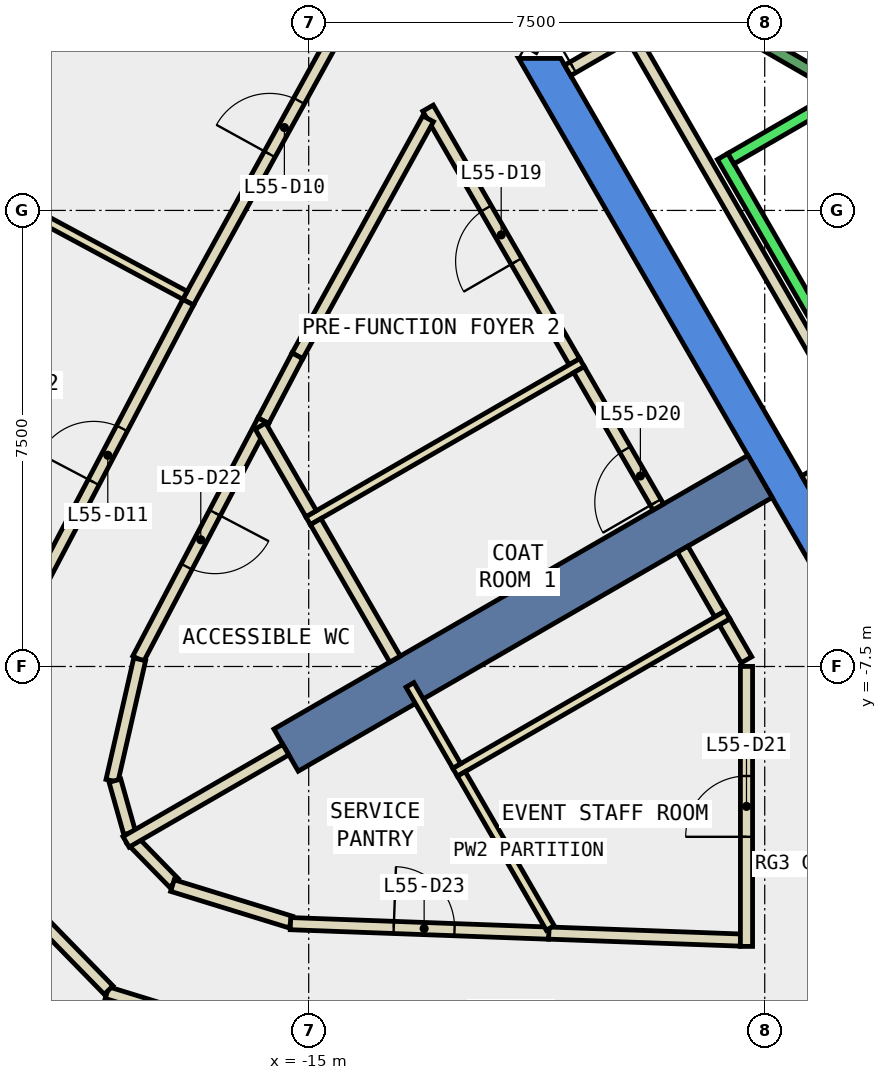
"""IFC4 building model, lengths in metres.
Left out: names, types, materials, properties, quantities, classifications, styles, units other than length and angle.
Written with IfcOpenShell. Run it as: python <this file> out.ifc"""

import sys

from ifc_helpers import new_model, si_unit, direction, frame, frame_2d, origin, place, context, subcontext, project, spatial, polyline, rectangle, outline, extrude, element, fill, save


model = new_model("IFC4")
c1 = context("Model", 3, precision=1e-05, world=origin(), true_north=direction((0.0, 1.0)))
c2 = subcontext(c1, "Body", "Model", "MODEL_VIEW")
j1 = project(units=[si_unit("LENGTHUNIT", "METRE"), si_unit("PLANEANGLEUNIT", "RADIAN")], contexts=[c1])
p1 = place(None, origin())
s1 = spatial("IfcSite", under=j1, at=p1, CompositionType="ELEMENT")
p2 = place(p1, origin())
s2 = spatial("IfcBuilding", under=s1, at=p2, CompositionType="ELEMENT")
p3 = place(p2, frame((0.0, 0.0, 245.0)))
s3 = spatial("IfcBuildingStorey", under=s2, at=p3, CompositionType="ELEMENT", Elevation=245.0)
p4 = place(p3, frame((0.0, 0.0, -0.34)))
e1 = element("IfcWall", 1, at=p4, inside=s3, PredefinedType="SHEAR", context=c2, shape_type="SweptSolid", body=[
    extrude(outline(polyline([(-11.547, 2.5), (-5.774, -7.5), (-5.427, -6.9), (-10.854, 2.5), (-11.547, 2.5)])), origin(), (0.0, 0.0, 1.0), 3.6),
])
p5 = place(p3, frame((-7.578, -4.375, -0.34), z_axis=(0.0, 0.0, 1.0), x_axis=(-0.866024315419, -0.5000018851, 0.0)))
e2 = element("IfcWall", 2, at=p5, inside=s3, PredefinedType="SHEAR", context=c2, shape_type="SweptSolid", body=[
    extrude(rectangle(XDim=9.0, YDim=0.8, at=frame_2d((4.5, 0.0))), origin(), (0.0, 0.0, 1.0), 3.6),
])
p6 = place(p3, frame((-18.805, 6.475, 0.0), z_axis=(0.0, 0.0, 1.0), x_axis=(-0.482734585173, -0.875766704253, 0.0)))
e3 = element("IfcWall", 3, at=p6, inside=s3, PredefinedType="STANDARD", context=c2, shape_type="SweptSolid", body=[
    extrude(rectangle(XDim=5.593, YDim=0.3, at=frame_2d((2.796, 0.0))), origin(), (0.0, 0.0, 1.0), 3.26),
])
p7 = place(p6, frame((0.698, 0.0, 0.9)))
e4 = element("IfcOpeningElement", 4, at=p7, cuts=e3, PredefinedType="OPENING", context=c2, shape_type="SweptSolid", body=[
    extrude(rectangle(XDim=1.4, YDim=2.0, at=frame_2d((0.7, 1.0))), frame((0.0, 0.16, 0.0), z_axis=(0.0, -1.0, 0.0), x_axis=(1.0, 0.0, 0.0)), (0.0, 0.0, 1.0), 0.32),
])
p8 = place(p6, frame((3.495, 0.0, 0.9)))
e5 = element("IfcOpeningElement", 5, at=p8, cuts=e3, PredefinedType="OPENING", context=c2, shape_type="SweptSolid", body=[
    extrude(rectangle(XDim=1.4, YDim=2.0, at=frame_2d((0.7, 1.0))), frame((0.0, 0.16, 0.0), z_axis=(0.0, -1.0, 0.0), x_axis=(1.0, 0.0, 0.0)), (0.0, 0.0, 1.0), 0.32),
])
p9 = place(p3, frame((-10.63, -2.488, 0.0), z_axis=(0.0, 0.0, 1.0), x_axis=(-0.500108649621, 0.865962665808, 0.0)))
e6 = element("IfcWall", 6, at=p9, inside=s3, PredefinedType="PARTITIONING", context=c2, shape_type="SweptSolid", body=[
    extrude(rectangle(XDim=4.815, YDim=0.2, at=frame_2d((2.408, 0.0))), origin(), (0.0, 0.0, 1.0), 3.26),
])
p10 = place(p9, frame((1.908, 0.0, 0.0)))
e7 = element("IfcOpeningElement", 7, at=p10, cuts=e6, PredefinedType="OPENING", context=c2, shape_type="SweptSolid", body=[
    extrude(rectangle(XDim=1.0, YDim=2.1, at=frame_2d((0.5, 1.05))), frame((0.0, 0.11, 0.0), z_axis=(0.0, -1.0, 0.0), x_axis=(1.0, 0.0, 0.0)), (0.0, 0.0, 1.0), 0.22),
])
p11 = place(p3, frame((-13.036, 1.508, 0.0), z_axis=(0.0, 0.0, 1.0), x_axis=(-0.482884552822, -0.87568402329, 0.0)))
e8 = element("IfcWall", 8, at=p11, inside=s3, PredefinedType="PARTITIONING", context=c2, shape_type="SweptSolid", body=[
    extrude(rectangle(XDim=4.453, YDim=0.2, at=frame_2d((2.226, 0.0))), origin(), (0.0, 0.0, 1.0), 3.26),
])
p12 = place(p3, frame((-15.186, -2.391, 0.0), z_axis=(0.0, 0.0, 1.0), x_axis=(-0.464794189951, -0.885418748948, 0.0)))
e9 = element("IfcWall", 9, at=p12, inside=s3, PredefinedType="PARTITIONING", context=c2, shape_type="SweptSolid", body=[
    extrude(rectangle(XDim=1.205, YDim=0.2, at=frame_2d((0.603, 0.0))), origin(), (0.0, 0.0, 1.0), 3.26),
])
p13 = place(p3, frame((-8.235, -6.636, 0.0), z_axis=(0.0, 0.0, 1.0), x_axis=(-0.500089055364, 0.86597398154, 0.0)))
e10 = element("IfcWall", 10, at=p13, inside=s3, PredefinedType="PARTITIONING", context=c2, shape_type="SweptSolid", body=[
    extrude(rectangle(XDim=1.23, YDim=0.2, at=frame_2d((0.615, 0.0))), origin(), (0.0, 0.0, 1.0), 3.26),
])
p14 = place(p3, frame((-7.8, -7.39, 0.0), z_axis=(0.0, 0.0, 1.0), x_axis=(-0.499712670472, 0.866191230024, 0.0)))
e11 = element("IfcWall", 11, at=p14, inside=s3, PredefinedType="PARTITIONING", context=c2, shape_type="SweptSolid", body=[
    extrude(rectangle(XDim=0.72, YDim=0.2, at=frame_2d((0.36, 0.0))), origin(), (0.0, 0.0, 1.0), 3.26),
])
p15 = place(p3, frame((-11.052, -11.884, 0.0), z_axis=(0.0, 0.0, 1.0), x_axis=(0.999335249241, -0.036456270033, 0.0)))
e12 = element("IfcWall", 12, at=p15, inside=s3, PredefinedType="PARTITIONING", context=c2, shape_type="SweptSolid", body=[
    extrude(rectangle(XDim=3.154, YDim=0.2, at=frame_2d((1.577, 0.0))), origin(), (0.0, 0.0, 1.0), 3.26),
])
p16 = place(p3, frame((-15.746, -3.458, 0.0), z_axis=(0.0, 0.0, 1.0), x_axis=(-0.465179971699, -0.885216128372, 0.0)))
e13 = element("IfcWall", 13, at=p16, inside=s3, PredefinedType="PARTITIONING", context=c2, shape_type="SweptSolid", body=[
    extrude(rectangle(XDim=4.424, YDim=0.2, at=frame_2d((2.212, 0.0))), origin(), (0.0, 0.0, 1.0), 3.26),
])
p17 = place(p16, frame((1.712, 0.0, 0.0)))
e14 = element("IfcOpeningElement", 14, at=p17, cuts=e13, PredefinedType="OPENING", context=c2, shape_type="SweptSolid", body=[
    extrude(rectangle(XDim=1.0, YDim=2.1, at=frame_2d((0.5, 1.05))), frame((0.0, 0.11, 0.0), z_axis=(0.0, -1.0, 0.0), x_axis=(1.0, 0.0, 0.0)), (0.0, 0.0, 1.0), 0.22),
])
p18 = place(p3, frame((-17.78, -7.383, 0.0), z_axis=(0.0, 0.0, 1.0), x_axis=(-0.222760041204, -0.974873306662, 0.0)))
e15 = element("IfcWall", 15, at=p18, inside=s3, PredefinedType="PARTITIONING", context=c2, shape_type="SweptSolid", body=[
    extrude(rectangle(XDim=2.047, YDim=0.2, at=frame_2d((1.024, 0.0))), origin(), (0.0, 0.0, 1.0), 3.26),
])
p19 = place(p3, frame((-18.187, -9.378, 0.0), z_axis=(0.0, 0.0, 1.0), x_axis=(0.270785141481, -0.962639811743, 0.0)))
e16 = element("IfcWall", 16, at=p19, inside=s3, PredefinedType="PARTITIONING", context=c2, shape_type="SweptSolid", body=[
    extrude(rectangle(XDim=0.894, YDim=0.2, at=frame_2d((0.447, 0.0))), origin(), (0.0, 0.0, 1.0), 3.26),
])
p20 = place(p3, frame((-17.915, -10.344, 0.0), z_axis=(0.0, 0.0, 1.0), x_axis=(0.698527813511, -0.715582904877, 0.0)))
e17 = element("IfcWall", 17, at=p20, inside=s3, PredefinedType="PARTITIONING", context=c2, shape_type="SweptSolid", body=[
    extrude(rectangle(XDim=1.002, YDim=0.2, at=frame_2d((0.501, 0.0))), origin(), (0.0, 0.0, 1.0), 3.26),
])
p21 = place(p3, frame((-17.241, -11.103, 0.0), z_axis=(0.0, 0.0, 1.0), x_axis=(0.95563113363, -0.294566013716, 0.0)))
e18 = element("IfcWall", 18, at=p21, inside=s3, PredefinedType="PARTITIONING", context=c2, shape_type="SweptSolid", body=[
    extrude(rectangle(XDim=2.036, YDim=0.2, at=frame_2d((1.018, 0.0))), origin(), (0.0, 0.0, 1.0), 3.26),
])
p22 = place(p3, frame((-15.3, -11.729, 0.0), z_axis=(0.0, 0.0, 1.0), x_axis=(0.999326350165, -0.036699398722, 0.0)))
e19 = element("IfcWall", 19, at=p22, inside=s3, PredefinedType="PARTITIONING", context=c2, shape_type="SweptSolid", body=[
    extrude(rectangle(XDim=4.251, YDim=0.2, at=frame_2d((2.125, 0.0))), origin(), (0.0, 0.0, 1.0), 3.26),
])
p23 = place(p22, frame((1.7, 0.0, 0.0)))
e20 = element("IfcOpeningElement", 20, at=p23, cuts=e19, PredefinedType="OPENING", context=c2, shape_type="SweptSolid", body=[
    extrude(rectangle(XDim=1.0, YDim=2.1, at=frame_2d((0.5, 1.05))), frame((0.0, 0.11, 0.0), z_axis=(0.0, -1.0, 0.0), x_axis=(1.0, 0.0, 0.0)), (0.0, 0.0, 1.0), 0.22),
])
p24 = place(p3, frame((-16.983, -1.509, 0.0), z_axis=(0.0, 0.0, 1.0), x_axis=(0.482785999899, 0.875738361785, 0.0)))
e21 = element("IfcWall", 21, at=p24, inside=s3, PredefinedType="PARTITIONING", context=c2, shape_type="SweptSolid", body=[
    extrude(rectangle(XDim=6.558, YDim=0.2, at=frame_2d((3.279, 0.0))), origin(), (0.0, 0.0, 1.0), 3.26),
])
p25 = place(p24, frame((2.779, 0.0, 0.0)))
e22 = element("IfcOpeningElement", 22, at=p25, cuts=e21, PredefinedType="OPENING", context=c2, shape_type="SweptSolid", body=[
    extrude(rectangle(XDim=1.0, YDim=2.1, at=frame_2d((0.5, 1.05))), frame((0.0, 0.11, 0.0), z_axis=(0.0, -1.0, 0.0), x_axis=(1.0, 0.0, 0.0)), (0.0, 0.0, 1.0), 0.22),
])
p26 = place(p3, frame((-19.696, -6.675, 0.0), z_axis=(0.0, 0.0, 1.0), x_axis=(0.465165163774, 0.88522390976, 0.0)))
e23 = element("IfcWall", 23, at=p26, inside=s3, PredefinedType="PARTITIONING", context=c2, shape_type="SweptSolid", body=[
    extrude(rectangle(XDim=5.835, YDim=0.2, at=frame_2d((2.917, 0.0))), origin(), (0.0, 0.0, 1.0), 3.26),
])
p27 = place(p26, frame((2.492, 0.0, 0.0)))
e24 = element("IfcOpeningElement", 24, at=p27, cuts=e23, PredefinedType="OPENING", context=c2, shape_type="SweptSolid", body=[
    extrude(rectangle(XDim=1.0, YDim=2.1, at=frame_2d((0.5, 1.05))), frame((0.0, 0.11, 0.0), z_axis=(0.0, -1.0, 0.0), x_axis=(1.0, 0.0, 0.0)), (0.0, 0.0, 1.0), 0.22),
])
p28 = place(p3, frame((-15.632, -13.692, 0.0), z_axis=(0.0, 0.0, 1.0), x_axis=(-0.955600342663, 0.294665887239, 0.0)))
e25 = element("IfcWall", 25, at=p28, inside=s3, PredefinedType="PARTITIONING", context=c2, shape_type="SweptSolid", body=[
    extrude(rectangle(XDim=2.81, YDim=0.2, at=frame_2d((1.405, 0.0))), origin(), (0.0, 0.0, 1.0), 3.26),
])
p29 = place(p3, frame((-18.291, -12.822, 0.0), z_axis=(0.0, 0.0, 1.0), x_axis=(-0.698477855606, 0.715631668687, 0.0)))
e26 = element("IfcWall", 26, at=p29, inside=s3, PredefinedType="PARTITIONING", context=c2, shape_type="SweptSolid", body=[
    extrude(rectangle(XDim=1.921, YDim=0.2, at=frame_2d((0.961, 0.0))), origin(), (0.0, 0.0, 1.0), 3.26),
])
p30 = place(p3, frame((-5.888, -3.902, 0.0), z_axis=(0.0, 0.0, 1.0), x_axis=(-0.86621513555, -0.499671230855, 0.0)))
e27 = element("IfcWall", 27, at=p30, inside=s3, PredefinedType="PARTITIONING", context=c2, shape_type="SweptSolid", body=[
    extrude(rectangle(XDim=1.1, YDim=0.2, at=frame_2d((0.55, 0.0))), origin(), (0.0, 0.0, 1.0), 3.26),
])
p31 = place(p3, frame((-10.741, 2.303, 0.0), z_axis=(0.0, 0.0, 1.0), x_axis=(0.866063652425, 0.499933745558, 0.0)))
e28 = element("IfcWall", 28, at=p31, inside=s3, PredefinedType="PARTITIONING", context=c2, shape_type="SweptSolid", body=[
    extrude(rectangle(XDim=1.1, YDim=0.2, at=frame_2d((0.55, 0.0))), origin(), (0.0, 0.0, 1.0), 3.26),
])
p32 = place(p31, frame((0.1, 0.0, 0.0)))
e29 = element("IfcOpeningElement", 29, at=p32, cuts=e28, PredefinedType="OPENING", context=c2, shape_type="SweptSolid", body=[
    extrude(rectangle(XDim=0.9, YDim=2.1, at=frame_2d((0.45, 1.05))), frame((0.0, 0.11, 0.0), z_axis=(0.0, -1.0, 0.0), x_axis=(1.0, 0.0, 0.0)), (0.0, 0.0, 1.0), 0.22),
])
p33 = place(p3, frame((-9.751, 2.99, 0.0), z_axis=(0.0, 0.0, 1.0), x_axis=(0.500012163284, -0.866018381195, 0.0)))
e30 = element("IfcWall", 30, at=p33, inside=s3, PredefinedType="PARTITIONING", context=c2, shape_type="SweptSolid", body=[
    extrude(rectangle(XDim=8.0, YDim=0.2, at=frame_2d((4.0, 0.0))), origin(), (0.0, 0.0, 1.0), 3.26),
])
p34 = place(p3, frame((-7.8, -12.103, 0.0), z_axis=(0.0, 0.0, 1.0), x_axis=(0.0, 1.0, 0.0)))
e31 = element("IfcWall", 31, at=p34, inside=s3, PredefinedType="PARTITIONING", context=c2, shape_type="SweptSolid", body=[
    extrude(rectangle(XDim=4.604, YDim=0.2, at=frame_2d((2.302, 0.0))), origin(), (0.0, 0.0, 1.0), 3.26),
])
p35 = place(p34, frame((1.802, 0.0, 0.0)))
e32 = element("IfcOpeningElement", 32, at=p35, cuts=e31, PredefinedType="OPENING", context=c2, shape_type="SweptSolid", body=[
    extrude(rectangle(XDim=1.0, YDim=2.1, at=frame_2d((0.5, 1.05))), frame((0.0, 0.11, 0.0), z_axis=(0.0, -1.0, 0.0), x_axis=(1.0, 0.0, 0.0)), (0.0, 0.0, 1.0), 0.22),
])
p36 = place(p3, frame((-10.506, -2.503, 0.0), z_axis=(0.0, 0.0, 1.0), x_axis=(-0.866044872465, -0.49996627774, 0.0)))
e33 = element("IfcWall", 33, at=p36, inside=s3, PredefinedType="PARTITIONING", context=c2, shape_type="SweptSolid", body=[
    extrude(rectangle(XDim=5.2, YDim=0.15, at=frame_2d((2.6, 0.0))), origin(), (0.0, 0.0, 1.0), 3.26),
])
p37 = place(p3, frame((-14.96, -4.988, 0.0), z_axis=(0.0, 0.0, 1.0), x_axis=(-0.500175017317, 0.865924333907, 0.0)))
e34 = element("IfcWall", 34, at=p37, inside=s3, PredefinedType="PARTITIONING", context=c2, shape_type="SweptSolid", body=[
    extrude(rectangle(XDim=1.666, YDim=0.2, at=frame_2d((0.833, 0.0))), origin(), (0.0, 0.0, 1.0), 3.26),
])
p38 = place(p3, frame((-8.111, -6.651, 0.0), z_axis=(0.0, 0.0, 1.0), x_axis=(-0.865984471925, -0.50007088936, 0.0)))
e35 = element("IfcWall", 35, at=p38, inside=s3, PredefinedType="PARTITIONING", context=c2, shape_type="SweptSolid", body=[
    extrude(rectangle(XDim=5.176, YDim=0.15, at=frame_2d((2.588, 0.0))), origin(), (0.0, 0.0, 1.0), 3.26),
])
p39 = place(p3, frame((-13.58, -7.379, 0.0), z_axis=(0.0, 0.0, 1.0), x_axis=(-0.499870876044, 0.866099940701, 0.0)))
e36 = element("IfcWall", 36, at=p39, inside=s3, PredefinedType="PARTITIONING", context=c2, shape_type="SweptSolid", body=[
    extrude(rectangle(XDim=2.611, YDim=0.2, at=frame_2d((1.305, 0.0))), origin(), (0.0, 0.0, 1.0), 3.26),
])
p40 = place(p3, frame((-12.565, -9.136, 0.0), z_axis=(0.0, 0.0, 1.0), x_axis=(-0.500198329269, 0.865910868044, 0.0)))
e37 = element("IfcWall", 37, at=p40, inside=s3, PredefinedType="PARTITIONING", context=c2, shape_type="SweptSolid", body=[
    extrude(rectangle(XDim=1.539, YDim=0.15, at=frame_2d((0.77, 0.0))), origin(), (0.0, 0.0, 1.0), 3.26),
])
p41 = place(p3, frame((-11.027, -11.8, 0.0), z_axis=(0.0, 0.0, 1.0), x_axis=(-0.499980071345, 0.866036909293, 0.0)))
e38 = element("IfcWall", 38, at=p41, inside=s3, PredefinedType="PARTITIONING", context=c2, shape_type="SweptSolid", body=[
    extrude(rectangle(XDim=2.926, YDim=0.15, at=frame_2d((1.463, 0.0))), origin(), (0.0, 0.0, 1.0), 3.26),
])
p42 = place(p3, frame((-15.377, -8.867, 0.0), z_axis=(0.0, 0.0, 1.0), x_axis=(-0.865965767548, -0.500103278768, 0.0)))
e39 = element("IfcWall", 39, at=p42, inside=s3, PredefinedType="PARTITIONING", context=c2, shape_type="SweptSolid", body=[
    extrude(rectangle(XDim=3.033, YDim=0.2, at=frame_2d((1.517, 0.0))), origin(), (0.0, 0.0, 1.0), 3.26),
])
p43 = place(p3, frame((-17.035, -1.396, 0.0), z_axis=(0.0, 0.0, 1.0), x_axis=(-0.88055795398, 0.473938487234, 0.0)))
e40 = element("IfcWall", 40, at=p43, inside=s3, PredefinedType="PARTITIONING", context=c2, shape_type="SweptSolid", body=[
    extrude(rectangle(XDim=3.88, YDim=0.15, at=frame_2d((1.94, 0.0))), origin(), (0.0, 0.0, 1.0), 3.26),
])
p44 = place(p3, frame((-9.25, -4.878, 0.0), z_axis=(0.0, 0.0, 1.0), x_axis=(-0.500032875382, 0.866006422342, 0.0)))
e41 = element("IfcWall", 41, at=p44, inside=s3, PredefinedType="PARTITIONING", context=c2, shape_type="SweptSolid", body=[
    extrude(rectangle(XDim=2.61, YDim=0.2, at=frame_2d((1.305, 0.0))), origin(), (0.0, 0.0, 1.0), 3.26),
])
p45 = place(p44, frame((0.09, 0.0, 0.0)))
e42 = element("IfcOpeningElement", 42, at=p45, cuts=e41, PredefinedType="OPENING", context=c2, shape_type="SweptSolid", body=[
    extrude(rectangle(XDim=1.0, YDim=2.1, at=frame_2d((0.5, 1.05))), frame((0.0, 0.11, 0.0), z_axis=(0.0, -1.0, 0.0), x_axis=(1.0, 0.0, 0.0)), (0.0, 0.0, 1.0), 0.22),
])
p46 = place(p3, frame((-8.192, 0.888, 0.0), z_axis=(0.0, 0.0, 1.0), x_axis=(0.500034260056, -0.866005622828, 0.0)))
e43 = element("IfcWall", 43, at=p46, inside=s3, PredefinedType="STANDARD", context=c2, shape_type="SweptSolid", body=[
    extrude(rectangle(XDim=5.399, YDim=0.2, at=frame_2d((2.7, 0.0))), origin(), (0.0, 0.0, 1.0), 3.26),
])
for number, where, z_axis, x_axis in (
    (44, (-5.977, 2.052, 0.0), (0.0, 0.0, 1.0), (-0.866, -0.5, 0.0)),
    (45, (-4.677, -0.2, 0.0), (0.0, 0.0, 1.0), (-0.866, -0.5, 0.0)),
):
    element("IfcWall", number, at=place(p3, frame(where, z_axis=z_axis, x_axis=x_axis)), inside=s3, PredefinedType="STANDARD", context=c2, shape_type="SweptSolid", body=[
        extrude(rectangle(XDim=2.399, YDim=0.2, at=frame_2d((1.2, 0.0))), origin(), (0.0, 0.0, 1.0), 3.26),
    ])
p47 = place(p3, frame((-6.25, 2.01, 0.0), z_axis=(0.0, 0.0, 1.0), x_axis=(-0.86611865017, 0.499838457731, 0.0)))
e46 = element("IfcWall", 46, at=p47, inside=s3, PredefinedType="STANDARD", context=c2, shape_type="SweptSolid", body=[
    extrude(rectangle(XDim=2.733, YDim=0.2, at=frame_2d((1.366, 0.0))), origin(), (0.0, 0.0, 1.0), 3.26),
])
p48 = place(p25, origin())
e47 = element("IfcDoor", 47, at=p48, inside=s3, OperationType="SINGLE_SWING_LEFT", PredefinedType="DOOR", context=c2, shape_type="SweptSolid", body=[
    extrude(rectangle(XDim=1.0, YDim=2.1, at=frame_2d((0.5, 1.05))), frame((0.0, 0.025, 0.0), z_axis=(0.0, -1.0, 0.0), x_axis=(1.0, 0.0, 0.0)), (0.0, 0.0, 1.0), 0.05),
])
fill(e22, e47)
p49 = place(p27, origin())
e48 = element("IfcDoor", 48, at=p49, inside=s3, OperationType="SINGLE_SWING_LEFT", PredefinedType="DOOR", context=c2, shape_type="SweptSolid", body=[
    extrude(rectangle(XDim=1.0, YDim=2.1, at=frame_2d((0.5, 1.05))), frame((0.0, 0.025, 0.0), z_axis=(0.0, -1.0, 0.0), x_axis=(1.0, 0.0, 0.0)), (0.0, 0.0, 1.0), 0.05),
])
fill(e24, e48)
p50 = place(p10, origin())
e49 = element("IfcDoor", 49, at=p50, inside=s3, OperationType="SINGLE_SWING_LEFT", PredefinedType="DOOR", context=c2, shape_type="SweptSolid", body=[
    extrude(rectangle(XDim=1.0, YDim=2.1, at=frame_2d((0.5, 1.05))), frame((0.0, 0.025, 0.0), z_axis=(0.0, -1.0, 0.0), x_axis=(1.0, 0.0, 0.0)), (0.0, 0.0, 1.0), 0.05),
])
fill(e7, e49)
p51 = place(p45, origin())
e50 = element("IfcDoor", 50, at=p51, inside=s3, OperationType="SINGLE_SWING_LEFT", PredefinedType="DOOR", context=c2, shape_type="SweptSolid", body=[
    extrude(rectangle(XDim=1.0, YDim=2.1, at=frame_2d((0.5, 1.05))), frame((0.0, 0.025, 0.0), z_axis=(0.0, -1.0, 0.0), x_axis=(1.0, 0.0, 0.0)), (0.0, 0.0, 1.0), 0.05),
])
fill(e42, e50)
p52 = place(p35, origin())
e51 = element("IfcDoor", 51, at=p52, inside=s3, OperationType="SINGLE_SWING_LEFT", PredefinedType="DOOR", context=c2, shape_type="SweptSolid", body=[
    extrude(rectangle(XDim=1.0, YDim=2.1, at=frame_2d((0.5, 1.05))), frame((0.0, 0.025, 0.0), z_axis=(0.0, -1.0, 0.0), x_axis=(1.0, 0.0, 0.0)), (0.0, 0.0, 1.0), 0.05),
])
fill(e32, e51)
p53 = place(p17, origin())
e52 = element("IfcDoor", 52, at=p53, inside=s3, OperationType="SINGLE_SWING_LEFT", PredefinedType="DOOR", context=c2, shape_type="SweptSolid", body=[
    extrude(rectangle(XDim=1.0, YDim=2.1, at=frame_2d((0.5, 1.05))), frame((0.0, 0.025, 0.0), z_axis=(0.0, -1.0, 0.0), x_axis=(1.0, 0.0, 0.0)), (0.0, 0.0, 1.0), 0.05),
])
fill(e14, e52)
p54 = place(p23, origin())
e53 = element("IfcDoor", 53, at=p54, inside=s3, OperationType="SINGLE_SWING_LEFT", PredefinedType="DOOR", context=c2, shape_type="SweptSolid", body=[
    extrude(rectangle(XDim=1.0, YDim=2.1, at=frame_2d((0.5, 1.05))), frame((0.0, 0.025, 0.0), z_axis=(0.0, -1.0, 0.0), x_axis=(1.0, 0.0, 0.0)), (0.0, 0.0, 1.0), 0.05),
])
fill(e20, e53)
p55 = place(p32, origin())
e54 = element("IfcDoor", 54, at=p55, inside=s3, OperationType="SINGLE_SWING_RIGHT", PredefinedType="DOOR", context=c2, shape_type="SweptSolid", body=[
    extrude(rectangle(XDim=0.9, YDim=2.1, at=frame_2d((0.45, 1.05))), frame((0.0, 0.025, 0.0), z_axis=(0.0, -1.0, 0.0), x_axis=(1.0, 0.0, 0.0)), (0.0, 0.0, 1.0), 0.05),
])
fill(e29, e54)
save(model, sys.argv[1])
